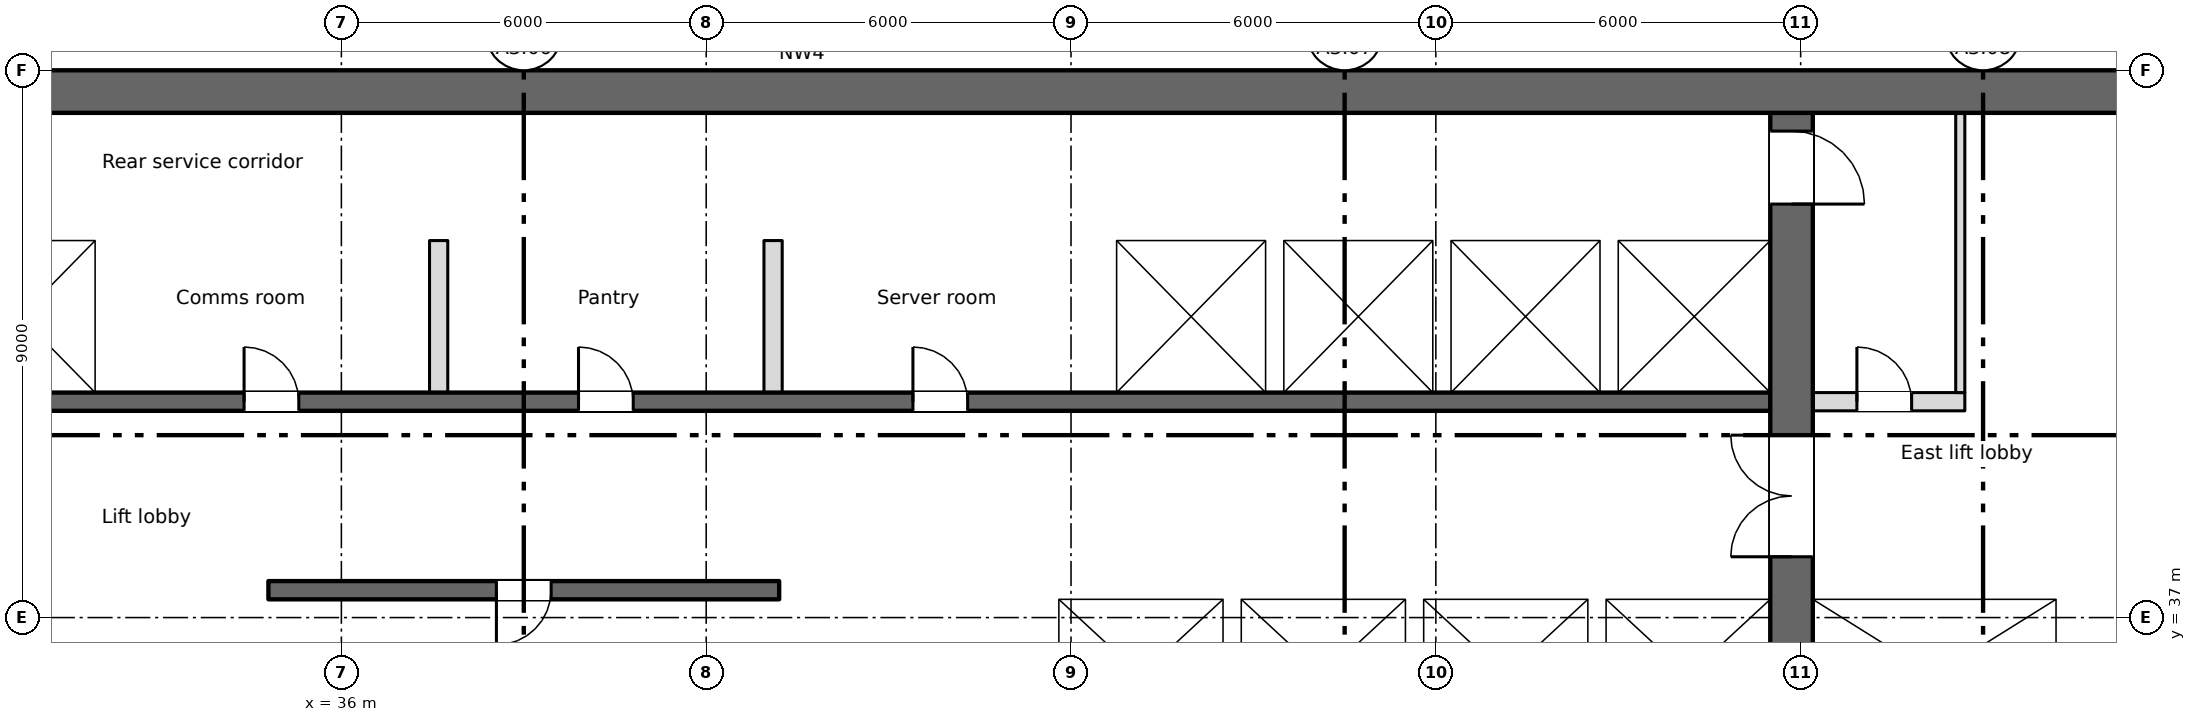
"""IFC4 building model, lengths in metres.
Left out: names, types, materials, properties, quantities, classifications, styles, units other than length and angle.
Written with IfcOpenShell. Run it as: python <this file> out.ifc"""

import sys

from ifc_helpers import new_model, si_unit, direction, frame, frame_2d, origin, place, context, subcontext, project, spatial, rectangle, extrude, element, fill, save


model = new_model("IFC4")
c1 = context("Model", 3, precision=1e-05, world=origin(), true_north=direction((0.0, 1.0)))
c2 = subcontext(c1, "Body", "Model", "MODEL_VIEW")
j1 = project(units=[si_unit("LENGTHUNIT", "METRE"), si_unit("PLANEANGLEUNIT", "RADIAN")], contexts=[c1])
p1 = place(None, origin())
s1 = spatial("IfcSite", under=j1, at=p1, CompositionType="ELEMENT")
p2 = place(p1, origin())
s2 = spatial("IfcBuilding", under=s1, at=p2, CompositionType="ELEMENT")
p3 = place(p2, frame((0.0, 0.0, 193.0)))
s3 = spatial("IfcBuildingStorey", under=s2, at=p3, CompositionType="ELEMENT", Elevation=193.0)
p4 = place(p3, frame((11.55, 45.65, 0.0), z_axis=(0.0, 0.0, 1.0), x_axis=(1.0, 0.0, 0.0)))
e1 = element("IfcWall", 1, at=p4, inside=s3, PredefinedType="SHEAR", context=c2, shape_type="SweptSolid", body=[
    extrude(rectangle(XDim=54.9, YDim=0.7, at=frame_2d((27.45, 0.0))), origin(), (0.0, 0.0, 1.0), 3.35),
])
p5 = place(p4, frame((1.2, 0.0, 0.6)))
e2 = element("IfcOpeningElement", 2, at=p5, cuts=e1, PredefinedType="OPENING", context=c2, shape_type="SweptSolid", body=[
    extrude(rectangle(XDim=0.6, YDim=2.4, at=frame_2d((0.3, 1.2))), frame((0.0, 0.36, 0.0), z_axis=(0.0, -1.0, 0.0), x_axis=(1.0, 0.0, 0.0)), (0.0, 0.0, 1.0), 0.72),
])
p6 = place(p3, frame((64.35, 34.8, 0.0), z_axis=(0.0, 0.0, 1.0), x_axis=(0.0, 1.0, 0.0)))
e3 = element("IfcWall", 3, at=p6, inside=s3, PredefinedType="SHEAR", context=c2, shape_type="SweptSolid", body=[
    extrude(rectangle(XDim=10.5, YDim=0.3, at=frame_2d((5.25, 0.0))), origin(), (0.0, 0.0, 1.0), 3.35),
])
p7 = place(p3, frame((59.85, 28.4, 0.0), z_axis=(0.0, 0.0, 1.0), x_axis=(0.0, 1.0, 0.0)))
e4 = element("IfcWall", 4, at=p7, inside=s3, PredefinedType="SHEAR", context=c2, shape_type="SweptSolid", body=[
    extrude(rectangle(XDim=16.9, YDim=0.7, at=frame_2d((8.45, 0.0))), origin(), (0.0, 0.0, 1.0), 3.35),
])
p8 = place(p7, frame((9.6, 0.0, 0.0)))
e5 = element("IfcOpeningElement", 5, at=p8, cuts=e4, PredefinedType="OPENING", context=c2, shape_type="SweptSolid", body=[
    extrude(rectangle(XDim=2.0, YDim=2.1, at=frame_2d((1.0, 1.05))), frame((0.0, 0.36, 0.0), z_axis=(0.0, -1.0, 0.0), x_axis=(1.0, 0.0, 0.0)), (0.0, 0.0, 1.0), 0.72),
])
p9 = place(p7, frame((15.4, 0.0, 0.0)))
e6 = element("IfcOpeningElement", 6, at=p9, cuts=e4, PredefinedType="OPENING", context=c2, shape_type="SweptSolid", body=[
    extrude(rectangle(XDim=1.2, YDim=2.1, at=frame_2d((0.6, 1.05))), frame((0.0, 0.36, 0.0), z_axis=(0.0, -1.0, 0.0), x_axis=(1.0, 0.0, 0.0)), (0.0, 0.0, 1.0), 0.72),
])
p10 = place(p3, frame((43.2, 37.45, 0.0), z_axis=(0.0, 0.0, 1.0), x_axis=(-1.0, 0.0, 0.0)))
e7 = element("IfcWall", 7, at=p10, inside=s3, PredefinedType="SHEAR", context=c2, shape_type="SweptSolid", body=[
    extrude(rectangle(XDim=8.4, YDim=0.3, at=frame_2d((4.2, 0.0))), origin(), (0.0, 0.0, 1.0), 3.35),
])
p11 = place(p10, frame((3.75, 0.0, 0.0)))
e8 = element("IfcOpeningElement", 8, at=p11, cuts=e7, PredefinedType="OPENING", context=c2, shape_type="SweptSolid", body=[
    extrude(rectangle(XDim=0.9, YDim=2.1, at=frame_2d((0.45, 1.05))), frame((0.0, 0.16, 0.0), z_axis=(0.0, -1.0, 0.0), x_axis=(1.0, 0.0, 0.0)), (0.0, 0.0, 1.0), 0.32),
])
p12 = place(p3, frame((47.3, 37.45, 0.0), z_axis=(0.0, 0.0, 1.0), x_axis=(1.0, 0.0, 0.0)))
e9 = element("IfcWall", 9, at=p12, inside=s3, PredefinedType="SHEAR", context=c2, shape_type="SweptSolid", body=[
    extrude(rectangle(XDim=12.2, YDim=0.3, at=frame_2d((6.1, 0.0))), origin(), (0.0, 0.0, 1.0), 3.35),
])
p13 = place(p12, frame((4.3, 0.0, 0.0)))
e10 = element("IfcOpeningElement", 10, at=p13, cuts=e9, PredefinedType="OPENING", context=c2, shape_type="SweptSolid", body=[
    extrude(rectangle(XDim=1.1, YDim=2.1, at=frame_2d((0.55, 1.05))), frame((0.0, 0.16, 0.0), z_axis=(0.0, -1.0, 0.0), x_axis=(1.0, 0.0, 0.0)), (0.0, 0.0, 1.0), 0.32),
])
p14 = place(p12, frame((7.3, 0.0, 0.0)))
e11 = element("IfcOpeningElement", 11, at=p14, cuts=e9, PredefinedType="OPENING", context=c2, shape_type="SweptSolid", body=[
    extrude(rectangle(XDim=1.1, YDim=2.1, at=frame_2d((0.55, 1.05))), frame((0.0, 0.16, 0.0), z_axis=(0.0, -1.0, 0.0), x_axis=(1.0, 0.0, 0.0)), (0.0, 0.0, 1.0), 0.32),
])
p15 = place(p12, frame((10.3, 0.0, 0.0)))
e12 = element("IfcOpeningElement", 12, at=p15, cuts=e9, PredefinedType="OPENING", context=c2, shape_type="SweptSolid", body=[
    extrude(rectangle(XDim=1.1, YDim=2.1, at=frame_2d((0.55, 1.05))), frame((0.0, 0.16, 0.0), z_axis=(0.0, -1.0, 0.0), x_axis=(1.0, 0.0, 0.0)), (0.0, 0.0, 1.0), 0.32),
])
p16 = place(p3, frame((60.2, 37.45, 0.0), z_axis=(0.0, 0.0, 1.0), x_axis=(1.0, 0.0, 0.0)))
e13 = element("IfcWall", 13, at=p16, inside=s3, PredefinedType="SHEAR", context=c2, shape_type="SweptSolid", body=[
    extrude(rectangle(XDim=4.0, YDim=0.3, at=frame_2d((2.0, 0.0))), origin(), (0.0, 0.0, 1.0), 3.35),
])
p17 = place(p16, frame((1.45, 0.0, 0.0)))
e14 = element("IfcOpeningElement", 14, at=p17, cuts=e13, PredefinedType="OPENING", context=c2, shape_type="SweptSolid", body=[
    extrude(rectangle(XDim=1.1, YDim=2.1, at=frame_2d((0.55, 1.05))), frame((0.0, 0.16, 0.0), z_axis=(0.0, -1.0, 0.0), x_axis=(1.0, 0.0, 0.0)), (0.0, 0.0, 1.0), 0.32),
])
for number, where, z_axis, x_axis in (
    (15, (34.95, 34.8, 0.0), (0.0, 0.0, 1.0), (0.0, 1.0, 0.0)),
    (16, (43.05, 34.8, 0.0), (0.0, 0.0, 1.0), (0.0, 1.0, 0.0)),
):
    element("IfcWall", number, at=place(p3, frame(where, z_axis=z_axis, x_axis=x_axis)), inside=s3, PredefinedType="SHEAR", context=c2, shape_type="SweptSolid", body=[
        extrude(rectangle(XDim=2.5, YDim=0.3, at=frame_2d((1.25, 0.0))), origin(), (0.0, 0.0, 1.0), 3.35),
    ])
p18 = place(p3, frame((47.55, 34.8, 0.0), z_axis=(0.0, 0.0, 1.0), x_axis=(0.0, 1.0, 0.0)))
e17 = element("IfcWall", 17, at=p18, inside=s3, PredefinedType="SHEAR", context=c2, shape_type="SweptSolid", body=[
    extrude(rectangle(XDim=2.5, YDim=0.5, at=frame_2d((1.25, 0.0))), origin(), (0.0, 0.0, 1.0), 3.35),
])
p19 = place(p3, frame((50.65, 34.8, 0.0), z_axis=(0.0, 0.0, 1.0), x_axis=(0.0, 1.0, 0.0)))
e18 = element("IfcWall", 18, at=p19, inside=s3, PredefinedType="SHEAR", context=c2, shape_type="SweptSolid", body=[
    extrude(rectangle(XDim=2.5, YDim=0.3, at=frame_2d((1.25, 0.0))), origin(), (0.0, 0.0, 1.0), 3.35),
])
p20 = place(p3, frame((18.5, 40.55, 0.0), z_axis=(0.0, 0.0, 1.0), x_axis=(1.0, 0.0, 0.0)))
e19 = element("IfcWall", 19, at=p20, inside=s3, PredefinedType="SHEAR", context=c2, shape_type="SweptSolid", body=[
    extrude(rectangle(XDim=41.0, YDim=0.3, at=frame_2d((20.5, 0.0))), origin(), (0.0, 0.0, 1.0), 3.35),
])
p21 = place(p20, frame((2.15, 0.0, 0.0)))
e20 = element("IfcOpeningElement", 20, at=p21, cuts=e19, PredefinedType="OPENING", context=c2, shape_type="SweptSolid", body=[
    extrude(rectangle(XDim=0.9, YDim=2.1, at=frame_2d((0.45, 1.05))), frame((0.0, 0.16, 0.0), z_axis=(0.0, -1.0, 0.0), x_axis=(1.0, 0.0, 0.0)), (0.0, 0.0, 1.0), 0.32),
])
p22 = place(p20, frame((15.9, 0.0, 0.0)))
e21 = element("IfcOpeningElement", 21, at=p22, cuts=e19, PredefinedType="OPENING", context=c2, shape_type="SweptSolid", body=[
    extrude(rectangle(XDim=0.9, YDim=2.1, at=frame_2d((0.45, 1.05))), frame((0.0, 0.16, 0.0), z_axis=(0.0, -1.0, 0.0), x_axis=(1.0, 0.0, 0.0)), (0.0, 0.0, 1.0), 0.32),
])
p23 = place(p20, frame((21.4, 0.0, 0.0)))
e22 = element("IfcOpeningElement", 22, at=p23, cuts=e19, PredefinedType="OPENING", context=c2, shape_type="SweptSolid", body=[
    extrude(rectangle(XDim=0.9, YDim=2.1, at=frame_2d((0.45, 1.05))), frame((0.0, 0.16, 0.0), z_axis=(0.0, -1.0, 0.0), x_axis=(1.0, 0.0, 0.0)), (0.0, 0.0, 1.0), 0.32),
])
p24 = place(p20, frame((26.9, 0.0, 0.0)))
e23 = element("IfcOpeningElement", 23, at=p24, cuts=e19, PredefinedType="OPENING", context=c2, shape_type="SweptSolid", body=[
    extrude(rectangle(XDim=0.9, YDim=2.1, at=frame_2d((0.45, 1.05))), frame((0.0, 0.16, 0.0), z_axis=(0.0, -1.0, 0.0), x_axis=(1.0, 0.0, 0.0)), (0.0, 0.0, 1.0), 0.32),
])
p25 = place(p20, frame((6.175, 0.0, 0.0)))
e24 = element("IfcOpeningElement", 24, at=p25, cuts=e19, PredefinedType="OPENING", context=c2, shape_type="SweptSolid", body=[
    extrude(rectangle(XDim=1.1, YDim=2.1, at=frame_2d((0.55, 1.05))), frame((0.0, 0.16, 0.0), z_axis=(0.0, -1.0, 0.0), x_axis=(1.0, 0.0, 0.0)), (0.0, 0.0, 1.0), 0.32),
])
p26 = place(p20, frame((8.925, 0.0, 0.0)))
e25 = element("IfcOpeningElement", 25, at=p26, cuts=e19, PredefinedType="OPENING", context=c2, shape_type="SweptSolid", body=[
    extrude(rectangle(XDim=1.1, YDim=2.1, at=frame_2d((0.55, 1.05))), frame((0.0, 0.16, 0.0), z_axis=(0.0, -1.0, 0.0), x_axis=(1.0, 0.0, 0.0)), (0.0, 0.0, 1.0), 0.32),
])
p27 = place(p20, frame((11.675, 0.0, 0.0)))
e26 = element("IfcOpeningElement", 26, at=p27, cuts=e19, PredefinedType="OPENING", context=c2, shape_type="SweptSolid", body=[
    extrude(rectangle(XDim=1.1, YDim=2.1, at=frame_2d((0.55, 1.05))), frame((0.0, 0.16, 0.0), z_axis=(0.0, -1.0, 0.0), x_axis=(1.0, 0.0, 0.0)), (0.0, 0.0, 1.0), 0.32),
])
p28 = place(p20, frame((30.925, 0.0, 0.0)))
e27 = element("IfcOpeningElement", 27, at=p28, cuts=e19, PredefinedType="OPENING", context=c2, shape_type="SweptSolid", body=[
    extrude(rectangle(XDim=1.1, YDim=2.1, at=frame_2d((0.55, 1.05))), frame((0.0, 0.16, 0.0), z_axis=(0.0, -1.0, 0.0), x_axis=(1.0, 0.0, 0.0)), (0.0, 0.0, 1.0), 0.32),
])
p29 = place(p20, frame((33.675, 0.0, 0.0)))
e28 = element("IfcOpeningElement", 28, at=p29, cuts=e19, PredefinedType="OPENING", context=c2, shape_type="SweptSolid", body=[
    extrude(rectangle(XDim=1.1, YDim=2.1, at=frame_2d((0.55, 1.05))), frame((0.0, 0.16, 0.0), z_axis=(0.0, -1.0, 0.0), x_axis=(1.0, 0.0, 0.0)), (0.0, 0.0, 1.0), 0.32),
])
p30 = place(p20, frame((36.375, 0.0, 0.0)))
e29 = element("IfcOpeningElement", 29, at=p30, cuts=e19, PredefinedType="OPENING", context=c2, shape_type="SweptSolid", body=[
    extrude(rectangle(XDim=1.2, YDim=2.1, at=frame_2d((0.6, 1.05))), frame((0.0, 0.16, 0.0), z_axis=(0.0, -1.0, 0.0), x_axis=(1.0, 0.0, 0.0)), (0.0, 0.0, 1.0), 0.32),
])
p31 = place(p20, frame((39.15, 0.0, 0.0)))
e30 = element("IfcOpeningElement", 30, at=p31, cuts=e19, PredefinedType="OPENING", context=c2, shape_type="SweptSolid", body=[
    extrude(rectangle(XDim=1.2, YDim=2.1, at=frame_2d((0.6, 1.05))), frame((0.0, 0.16, 0.0), z_axis=(0.0, -1.0, 0.0), x_axis=(1.0, 0.0, 0.0)), (0.0, 0.0, 1.0), 0.32),
])
p32 = place(p3, frame((18.5, 43.35, 0.0), z_axis=(0.0, 0.0, 1.0), x_axis=(1.0, 0.0, 0.0)))
e31 = element("IfcWall", 31, at=p32, inside=s3, PredefinedType="SHEAR", context=c2, shape_type="SweptSolid", body=[
    extrude(rectangle(XDim=41.0, YDim=0.3, at=frame_2d((20.5, 0.0))), origin(), (0.0, 0.0, 1.0), 3.35),
])
p33 = place(p3, frame((60.2, 40.55, 0.0), z_axis=(0.0, 0.0, 1.0), x_axis=(1.0, 0.0, 0.0)))
e32 = element("IfcWall", 32, at=p33, inside=s3, PredefinedType="PARTITIONING", context=c2, shape_type="SweptSolid", body=[
    extrude(rectangle(XDim=2.5, YDim=0.3, at=frame_2d((1.25, 0.0))), origin(), (0.0, 0.0, 1.0), 3.35),
])
p34 = place(p33, frame((0.725, 0.0, 0.0)))
e33 = element("IfcOpeningElement", 33, at=p34, cuts=e32, PredefinedType="OPENING", context=c2, shape_type="SweptSolid", body=[
    extrude(rectangle(XDim=0.9, YDim=2.1, at=frame_2d((0.45, 1.05))), frame((0.0, 0.16, 0.0), z_axis=(0.0, -1.0, 0.0), x_axis=(1.0, 0.0, 0.0)), (0.0, 0.0, 1.0), 0.32),
])
for number, where, z_axis, x_axis in (
    (34, (53.65, 34.8, 0.0), (0.0, 0.0, 1.0), (0.0, 1.0, 0.0)),
    (35, (56.65, 34.8, 0.0), (0.0, 0.0, 1.0), (0.0, 1.0, 0.0)),
    (36, (32.1, 40.7, 0.0), (0.0, 0.0, 1.0), (0.0, 1.0, 0.0)),
    (37, (48.6, 40.7, 0.0), (0.0, 0.0, 1.0), (0.0, 1.0, 0.0)),
    (38, (51.35, 40.7, 0.0), (0.0, 0.0, 1.0), (0.0, 1.0, 0.0)),
    (39, (54.1, 40.7, 0.0), (0.0, 0.0, 1.0), (0.0, 1.0, 0.0)),
    (40, (56.85, 40.7, 0.0), (0.0, 0.0, 1.0), (0.0, 1.0, 0.0)),
):
    element("IfcWall", number, at=place(p3, frame(where, z_axis=z_axis, x_axis=x_axis)), inside=s3, PredefinedType="SHEAR", context=c2, shape_type="SweptSolid", body=[
        extrude(rectangle(XDim=2.5, YDim=0.3, at=frame_2d((1.25, 0.0))), origin(), (0.0, 0.0, 1.0), 3.35),
    ])
p35 = place(p3, frame((62.625, 40.7, 0.0), z_axis=(0.0, 0.0, 1.0), x_axis=(0.0, 1.0, 0.0)))
e41 = element("IfcWall", 41, at=p35, inside=s3, PredefinedType="PARTITIONING", context=c2, shape_type="SweptSolid", body=[
    extrude(rectangle(XDim=4.6, YDim=0.15, at=frame_2d((2.3, 0.0))), origin(), (0.0, 0.0, 1.0), 3.35),
])
for number, where, z_axis, x_axis in (
    (42, (37.6, 40.7, 0.0), (0.0, 0.0, 1.0), (0.0, 1.0, 0.0)),
    (43, (43.1, 40.7, 0.0), (0.0, 0.0, 1.0), (0.0, 1.0, 0.0)),
):
    element("IfcWall", number, at=place(p3, frame(where, z_axis=z_axis, x_axis=x_axis)), inside=s3, PredefinedType="PARTITIONING", context=c2, shape_type="SweptSolid", body=[
        extrude(rectangle(XDim=2.5, YDim=0.3, at=frame_2d((1.25, 0.0))), origin(), (0.0, 0.0, 1.0), 3.35),
    ])
p36 = place(p34, origin())
e44 = element("IfcDoor", 44, at=p36, inside=s3, OperationType="SINGLE_SWING_LEFT", PredefinedType="DOOR", context=c2, shape_type="SweptSolid", body=[
    extrude(rectangle(XDim=0.9, YDim=2.1, at=frame_2d((0.45, 1.05))), frame((0.0, 0.025, 0.0), z_axis=(0.0, -1.0, 0.0), x_axis=(1.0, 0.0, 0.0)), (0.0, 0.0, 1.0), 0.05),
])
fill(e33, e44)
p37 = place(p11, origin())
e45 = element("IfcDoor", 45, at=p37, inside=s3, OperationType="SINGLE_SWING_RIGHT", PredefinedType="DOOR", context=c2, shape_type="SweptSolid", body=[
    extrude(rectangle(XDim=0.9, YDim=2.1, at=frame_2d((0.45, 1.05))), frame((0.0, 0.025, 0.0), z_axis=(0.0, -1.0, 0.0), x_axis=(1.0, 0.0, 0.0)), (0.0, 0.0, 1.0), 0.05),
])
fill(e8, e45)
p38 = place(p22, origin())
e46 = element("IfcDoor", 46, at=p38, inside=s3, OperationType="SINGLE_SWING_LEFT", PredefinedType="DOOR", context=c2, shape_type="SweptSolid", body=[
    extrude(rectangle(XDim=0.9, YDim=2.1, at=frame_2d((0.45, 1.05))), frame((0.0, 0.025, 0.0), z_axis=(0.0, -1.0, 0.0), x_axis=(1.0, 0.0, 0.0)), (0.0, 0.0, 1.0), 0.05),
])
fill(e21, e46)
p39 = place(p23, origin())
e47 = element("IfcDoor", 47, at=p39, inside=s3, OperationType="SINGLE_SWING_LEFT", PredefinedType="DOOR", context=c2, shape_type="SweptSolid", body=[
    extrude(rectangle(XDim=0.9, YDim=2.1, at=frame_2d((0.45, 1.05))), frame((0.0, 0.025, 0.0), z_axis=(0.0, -1.0, 0.0), x_axis=(1.0, 0.0, 0.0)), (0.0, 0.0, 1.0), 0.05),
])
fill(e22, e47)
p40 = place(p24, origin())
e48 = element("IfcDoor", 48, at=p40, inside=s3, OperationType="SINGLE_SWING_LEFT", PredefinedType="DOOR", context=c2, shape_type="SweptSolid", body=[
    extrude(rectangle(XDim=0.9, YDim=2.1, at=frame_2d((0.45, 1.05))), frame((0.0, 0.025, 0.0), z_axis=(0.0, -1.0, 0.0), x_axis=(1.0, 0.0, 0.0)), (0.0, 0.0, 1.0), 0.05),
])
fill(e23, e48)
p41 = place(p13, origin())
e49 = element("IfcDoor", 49, at=p41, inside=s3, OperationType="SLIDING_TO_LEFT", PredefinedType="DOOR", context=c2, shape_type="SweptSolid", body=[
    extrude(rectangle(XDim=1.1, YDim=2.1, at=frame_2d((0.55, 1.05))), frame((0.0, 0.025, 0.0), z_axis=(0.0, -1.0, 0.0), x_axis=(1.0, 0.0, 0.0)), (0.0, 0.0, 1.0), 0.05),
])
fill(e10, e49)
p42 = place(p14, origin())
e50 = element("IfcDoor", 50, at=p42, inside=s3, OperationType="SLIDING_TO_LEFT", PredefinedType="DOOR", context=c2, shape_type="SweptSolid", body=[
    extrude(rectangle(XDim=1.1, YDim=2.1, at=frame_2d((0.55, 1.05))), frame((0.0, 0.025, 0.0), z_axis=(0.0, -1.0, 0.0), x_axis=(1.0, 0.0, 0.0)), (0.0, 0.0, 1.0), 0.05),
])
fill(e11, e50)
p43 = place(p15, origin())
e51 = element("IfcDoor", 51, at=p43, inside=s3, OperationType="SLIDING_TO_LEFT", PredefinedType="DOOR", context=c2, shape_type="SweptSolid", body=[
    extrude(rectangle(XDim=1.1, YDim=2.1, at=frame_2d((0.55, 1.05))), frame((0.0, 0.025, 0.0), z_axis=(0.0, -1.0, 0.0), x_axis=(1.0, 0.0, 0.0)), (0.0, 0.0, 1.0), 0.05),
])
fill(e12, e51)
p44 = place(p27, origin())
e52 = element("IfcDoor", 52, at=p44, inside=s3, OperationType="SLIDING_TO_LEFT", PredefinedType="DOOR", context=c2, shape_type="SweptSolid", body=[
    extrude(rectangle(XDim=1.1, YDim=2.1, at=frame_2d((0.55, 1.05))), frame((0.0, 0.025, 0.0), z_axis=(0.0, -1.0, 0.0), x_axis=(1.0, 0.0, 0.0)), (0.0, 0.0, 1.0), 0.05),
])
fill(e26, e52)
p45 = place(p28, origin())
e53 = element("IfcDoor", 53, at=p45, inside=s3, OperationType="SLIDING_TO_LEFT", PredefinedType="DOOR", context=c2, shape_type="SweptSolid", body=[
    extrude(rectangle(XDim=1.1, YDim=2.1, at=frame_2d((0.55, 1.05))), frame((0.0, 0.025, 0.0), z_axis=(0.0, -1.0, 0.0), x_axis=(1.0, 0.0, 0.0)), (0.0, 0.0, 1.0), 0.05),
])
fill(e27, e53)
p46 = place(p29, origin())
e54 = element("IfcDoor", 54, at=p46, inside=s3, OperationType="SLIDING_TO_LEFT", PredefinedType="DOOR", context=c2, shape_type="SweptSolid", body=[
    extrude(rectangle(XDim=1.1, YDim=2.1, at=frame_2d((0.55, 1.05))), frame((0.0, 0.025, 0.0), z_axis=(0.0, -1.0, 0.0), x_axis=(1.0, 0.0, 0.0)), (0.0, 0.0, 1.0), 0.05),
])
fill(e28, e54)
p47 = place(p30, origin())
e55 = element("IfcDoor", 55, at=p47, inside=s3, OperationType="SLIDING_TO_LEFT", PredefinedType="DOOR", context=c2, shape_type="SweptSolid", body=[
    extrude(rectangle(XDim=1.2, YDim=2.1, at=frame_2d((0.6, 1.05))), frame((0.0, 0.025, 0.0), z_axis=(0.0, -1.0, 0.0), x_axis=(1.0, 0.0, 0.0)), (0.0, 0.0, 1.0), 0.05),
])
fill(e29, e55)
p48 = place(p31, origin())
e56 = element("IfcDoor", 56, at=p48, inside=s3, OperationType="SLIDING_TO_LEFT", PredefinedType="DOOR", context=c2, shape_type="SweptSolid", body=[
    extrude(rectangle(XDim=1.2, YDim=2.1, at=frame_2d((0.6, 1.05))), frame((0.0, 0.025, 0.0), z_axis=(0.0, -1.0, 0.0), x_axis=(1.0, 0.0, 0.0)), (0.0, 0.0, 1.0), 0.05),
])
fill(e30, e56)
p49 = place(p17, origin())
e57 = element("IfcDoor", 57, at=p49, inside=s3, OperationType="SLIDING_TO_LEFT", PredefinedType="DOOR", context=c2, shape_type="SweptSolid", body=[
    extrude(rectangle(XDim=1.1, YDim=2.1, at=frame_2d((0.55, 1.05))), frame((0.0, 0.025, 0.0), z_axis=(0.0, -1.0, 0.0), x_axis=(1.0, 0.0, 0.0)), (0.0, 0.0, 1.0), 0.05),
])
fill(e14, e57)
p50 = place(p8, origin())
e58 = element("IfcDoor", 58, at=p50, inside=s3, OperationType="DOUBLE_DOOR_SINGLE_SWING", PredefinedType="DOOR", context=c2, shape_type="SweptSolid", body=[
    extrude(rectangle(XDim=2.0, YDim=2.1, at=frame_2d((1.0, 1.05))), frame((0.0, 0.025, 0.0), z_axis=(0.0, -1.0, 0.0), x_axis=(1.0, 0.0, 0.0)), (0.0, 0.0, 1.0), 0.05),
])
fill(e5, e58)
p51 = place(p9, origin())
e59 = element("IfcDoor", 59, at=p51, inside=s3, OperationType="SINGLE_SWING_LEFT", PredefinedType="DOOR", context=c2, shape_type="SweptSolid", body=[
    extrude(rectangle(XDim=1.2, YDim=2.1, at=frame_2d((0.6, 1.05))), frame((0.0, 0.025, 0.0), z_axis=(0.0, -1.0, 0.0), x_axis=(1.0, 0.0, 0.0)), (0.0, 0.0, 1.0), 0.05),
])
fill(e6, e59)
save(model, sys.argv[1])
